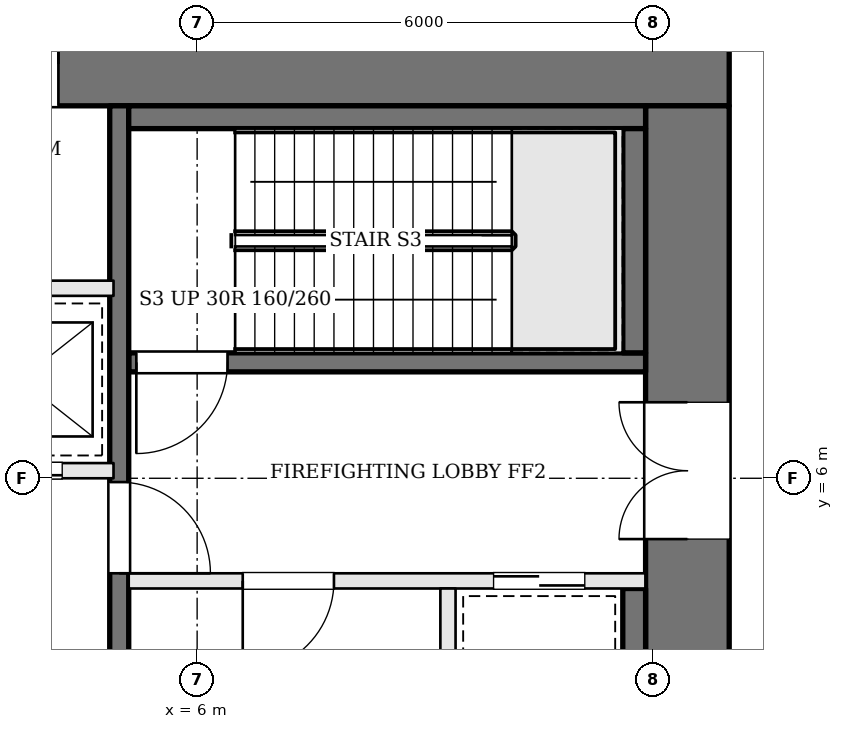
"""IFC4 building model, lengths in metres.
Left out: names, types, materials, properties, quantities, classifications, styles, units other than length and angle.
Written with IfcOpenShell. Run it as: python <this file> out.ifc"""

import sys

from ifc_helpers import new_model, si_unit, direction, frame, frame_2d, origin, place, context, subcontext, project, spatial, rectangle, extrude, element, fill, save


model = new_model("IFC4")
c1 = context("Model", 3, precision=1e-05, world=origin(), true_north=direction((0.0, 1.0)))
c2 = subcontext(c1, "Body", "Model", "MODEL_VIEW")
j1 = project(units=[si_unit("LENGTHUNIT", "METRE"), si_unit("PLANEANGLEUNIT", "RADIAN")], contexts=[c1])
p1 = place(None, origin())
s1 = spatial("IfcSite", under=j1, at=p1, CompositionType="ELEMENT")
p2 = place(p1, origin())
s2 = spatial("IfcBuilding", under=s1, at=p2, CompositionType="ELEMENT")
p3 = place(p2, frame((0.0, 0.0, 125.7)))
s3 = spatial("IfcBuildingStorey", under=s2, at=p3, CompositionType="ELEMENT", Elevation=125.7)
p4 = place(p3, frame((-13.0, 11.45, 0.0), z_axis=(0.0, 0.0, 1.0), x_axis=(1.0, 0.0, 0.0)))
e1 = element("IfcWall", 1, at=p4, inside=s3, PredefinedType="SHEAR", context=c2, shape_type="SweptSolid", body=[
    extrude(rectangle(XDim=26.0, YDim=1.1, at=frame_2d((13.0, 0.0))), origin(), (0.0, 0.0, 1.0), 4.8),
])
p5 = place(p4, frame((9.375, 0.0, 0.0)))
e2 = element("IfcOpeningElement", 2, at=p5, cuts=e1, PredefinedType="OPENING", context=c2, shape_type="SweptSolid", body=[
    extrude(rectangle(XDim=0.7, YDim=2.1, at=frame_2d((0.35, 1.05))), frame((0.0, 0.56, 0.0), z_axis=(0.0, -1.0, 0.0), x_axis=(1.0, 0.0, 0.0)), (0.0, 0.0, 1.0), 1.12),
])
p6 = place(p4, frame((11.825, 0.0, 0.0)))
e3 = element("IfcOpeningElement", 3, at=p6, cuts=e1, PredefinedType="OPENING", context=c2, shape_type="SweptSolid", body=[
    extrude(rectangle(XDim=0.7, YDim=2.1, at=frame_2d((0.35, 1.05))), frame((0.0, 0.56, 0.0), z_axis=(0.0, -1.0, 0.0), x_axis=(1.0, 0.0, 0.0)), (0.0, 0.0, 1.0), 1.12),
])
p7 = place(p4, frame((13.725, 0.0, 0.0)))
e4 = element("IfcOpeningElement", 4, at=p7, cuts=e1, PredefinedType="OPENING", context=c2, shape_type="SweptSolid", body=[
    extrude(rectangle(XDim=1.0, YDim=2.1, at=frame_2d((0.5, 1.05))), frame((0.0, 0.56, 0.0), z_axis=(0.0, -1.0, 0.0), x_axis=(1.0, 0.0, 0.0)), (0.0, 0.0, 1.0), 1.12),
])
p8 = place(p4, frame((16.175, 0.0, 0.0)))
e5 = element("IfcOpeningElement", 5, at=p8, cuts=e1, PredefinedType="OPENING", context=c2, shape_type="SweptSolid", body=[
    extrude(rectangle(XDim=1.0, YDim=2.1, at=frame_2d((0.5, 1.05))), frame((0.0, 0.56, 0.0), z_axis=(0.0, -1.0, 0.0), x_axis=(1.0, 0.0, 0.0)), (0.0, 0.0, 1.0), 1.12),
])
p9 = place(p3, frame((12.45, -1.9, 0.0), z_axis=(0.0, 0.0, 1.0), x_axis=(0.0, 1.0, 0.0)))
e6 = element("IfcWall", 6, at=p9, inside=s3, PredefinedType="SHEAR", context=c2, shape_type="SweptSolid", body=[
    extrude(rectangle(XDim=12.8, YDim=1.1, at=frame_2d((6.4, 0.0))), origin(), (0.0, 0.0, 1.0), 4.8),
])
p10 = place(p9, frame((7.1, 0.0, 0.0)))
e7 = element("IfcOpeningElement", 7, at=p10, cuts=e6, PredefinedType="OPENING", context=c2, shape_type="SweptSolid", body=[
    extrude(rectangle(XDim=1.8, YDim=2.1, at=frame_2d((0.9, 1.05))), frame((0.0, 0.56, 0.0), z_axis=(0.0, -1.0, 0.0), x_axis=(1.0, 0.0, 0.0)), (0.0, 0.0, 1.0), 1.12),
])
p11 = place(p3, frame((11.9, 7.525, 0.0), z_axis=(0.0, 0.0, 1.0), x_axis=(-1.0, 0.0, 0.0)))
e8 = element("IfcWall", 8, at=p11, inside=s3, PredefinedType="SOLIDWALL", context=c2, shape_type="SweptSolid", body=[
    extrude(rectangle(XDim=6.8, YDim=0.25, at=frame_2d((3.4, 0.0))), origin(), (0.0, 0.0, 1.0), 4.6),
])
p12 = place(p11, frame((5.5, 0.0, 0.0)))
e9 = element("IfcOpeningElement", 9, at=p12, cuts=e8, PredefinedType="OPENING", context=c2, shape_type="SweptSolid", body=[
    extrude(rectangle(XDim=1.2, YDim=2.1, at=frame_2d((0.6, 1.05))), frame((0.0, 0.135, 0.0), z_axis=(0.0, -1.0, 0.0), x_axis=(1.0, 0.0, 0.0)), (0.0, 0.0, 1.0), 0.27),
])
p13 = place(p3, frame((11.9, 4.65, 0.0), z_axis=(0.0, 0.0, 1.0), x_axis=(-1.0, 0.0, 0.0)))
e10 = element("IfcWall", 10, at=p13, inside=s3, PredefinedType="SOLIDWALL", context=c2, shape_type="SweptSolid", body=[
    extrude(rectangle(XDim=6.8, YDim=0.2, at=frame_2d((3.4, 0.0))), origin(), (0.0, 0.0, 1.0), 4.6),
])
p14 = place(p13, frame((4.1, 0.0, 0.0)))
e11 = element("IfcOpeningElement", 11, at=p14, cuts=e10, PredefinedType="OPENING", context=c2, shape_type="SweptSolid", body=[
    extrude(rectangle(XDim=1.2, YDim=2.1, at=frame_2d((0.6, 1.05))), frame((0.0, 0.11, 0.0), z_axis=(0.0, -1.0, 0.0), x_axis=(1.0, 0.0, 0.0)), (0.0, 0.0, 1.0), 0.22),
])
p15 = place(p13, frame((0.8, 0.0, 0.0)))
e12 = element("IfcOpeningElement", 12, at=p15, cuts=e10, PredefinedType="OPENING", context=c2, shape_type="SweptSolid", body=[
    extrude(rectangle(XDim=1.2, YDim=2.1, at=frame_2d((0.6, 1.05))), frame((0.0, 0.11, 0.0), z_axis=(0.0, -1.0, 0.0), x_axis=(1.0, 0.0, 0.0)), (0.0, 0.0, 1.0), 0.22),
])
p16 = place(p3, frame((9.3, 4.55, 0.0), z_axis=(0.0, 0.0, 1.0), x_axis=(0.0, -1.0, 0.0)))
e13 = element("IfcWall", 13, at=p16, inside=s3, PredefinedType="SOLIDWALL", context=c2, shape_type="SweptSolid", body=[
    extrude(rectangle(XDim=3.0, YDim=0.2, at=frame_2d((1.5, 0.0))), origin(), (0.0, 0.0, 1.0), 4.6),
])
p17 = place(p3, frame((4.975, 10.9, 0.0), z_axis=(0.0, 0.0, 1.0), x_axis=(0.0, -1.0, 0.0)))
e14 = element("IfcWall", 14, at=p17, inside=s3, PredefinedType="SOLIDWALL", context=c2, shape_type="SweptSolid", body=[
    extrude(rectangle(XDim=12.8, YDim=0.25, at=frame_2d((6.4, 0.0))), origin(), (0.0, 0.0, 1.0), 4.6),
])
p18 = place(p17, frame((4.95, 0.0, 0.0)))
e15 = element("IfcOpeningElement", 15, at=p18, cuts=e14, PredefinedType="OPENING", context=c2, shape_type="SweptSolid", body=[
    extrude(rectangle(XDim=1.2, YDim=2.1, at=frame_2d((0.6, 1.05))), frame((0.0, 0.135, 0.0), z_axis=(0.0, -1.0, 0.0), x_axis=(1.0, 0.0, 0.0)), (0.0, 0.0, 1.0), 0.27),
])
p19 = place(p3, frame((11.9, 10.75, 0.0), z_axis=(0.0, 0.0, 1.0), x_axis=(-1.0, 0.0, 0.0)))
e16 = element("IfcWall", 16, at=p19, inside=s3, PredefinedType="SOLIDWALL", context=c2, shape_type="SweptSolid", body=[
    extrude(rectangle(XDim=6.8, YDim=0.3, at=frame_2d((3.4, 0.0))), origin(), (0.0, 0.0, 1.0), 4.6),
])
p20 = place(p3, frame((11.75, 10.6, 0.0), z_axis=(0.0, 0.0, 1.0), x_axis=(0.0, -1.0, 0.0)))
e17 = element("IfcWall", 17, at=p20, inside=s3, PredefinedType="SOLIDWALL", context=c2, shape_type="SweptSolid", body=[
    extrude(rectangle(XDim=2.95, YDim=0.3, at=frame_2d((1.475, 0.0))), origin(), (0.0, 0.0, 1.0), 4.6),
])
p21 = place(p3, frame((11.75, 4.55, 0.0), z_axis=(0.0, 0.0, 1.0), x_axis=(0.0, -1.0, 0.0)))
e18 = element("IfcWall", 18, at=p21, inside=s3, PredefinedType="SOLIDWALL", context=c2, shape_type="SweptSolid", body=[
    extrude(rectangle(XDim=3.0, YDim=0.3, at=frame_2d((1.5, 0.0))), origin(), (0.0, 0.0, 1.0), 4.6),
])
p22 = place(p3, frame((-4.9, 6.1, 0.0), z_axis=(0.0, 0.0, 1.0), x_axis=(1.0, 0.0, 0.0)))
e19 = element("IfcWall", 19, at=p22, inside=s3, PredefinedType="SOLIDWALL", context=c2, shape_type="SweptSolid", body=[
    extrude(rectangle(XDim=9.8, YDim=0.2, at=frame_2d((4.9, 0.0))), origin(), (0.0, 0.0, 1.0), 4.6),
])
p23 = place(p22, frame((0.675, 0.0, 0.0)))
e20 = element("IfcOpeningElement", 20, at=p23, cuts=e19, PredefinedType="OPENING", context=c2, shape_type="SweptSolid", body=[
    extrude(rectangle(XDim=1.1, YDim=2.1, at=frame_2d((0.55, 1.05))), frame((0.0, 0.11, 0.0), z_axis=(0.0, -1.0, 0.0), x_axis=(1.0, 0.0, 0.0)), (0.0, 0.0, 1.0), 0.22),
])
p24 = place(p22, frame((3.125, 0.0, 0.0)))
e21 = element("IfcOpeningElement", 21, at=p24, cuts=e19, PredefinedType="OPENING", context=c2, shape_type="SweptSolid", body=[
    extrude(rectangle(XDim=1.1, YDim=2.1, at=frame_2d((0.55, 1.05))), frame((0.0, 0.11, 0.0), z_axis=(0.0, -1.0, 0.0), x_axis=(1.0, 0.0, 0.0)), (0.0, 0.0, 1.0), 0.22),
])
p25 = place(p22, frame((5.575, 0.0, 0.0)))
e22 = element("IfcOpeningElement", 22, at=p25, cuts=e19, PredefinedType="OPENING", context=c2, shape_type="SweptSolid", body=[
    extrude(rectangle(XDim=1.1, YDim=2.1, at=frame_2d((0.55, 1.05))), frame((0.0, 0.11, 0.0), z_axis=(0.0, -1.0, 0.0), x_axis=(1.0, 0.0, 0.0)), (0.0, 0.0, 1.0), 0.22),
])
p26 = place(p22, frame((8.025, 0.0, 0.0)))
e23 = element("IfcOpeningElement", 23, at=p26, cuts=e19, PredefinedType="OPENING", context=c2, shape_type="SweptSolid", body=[
    extrude(rectangle(XDim=1.1, YDim=2.1, at=frame_2d((0.55, 1.05))), frame((0.0, 0.11, 0.0), z_axis=(0.0, -1.0, 0.0), x_axis=(1.0, 0.0, 0.0)), (0.0, 0.0, 1.0), 0.22),
])
p27 = place(p3, frame((-4.9, 8.5, 0.0), z_axis=(0.0, 0.0, 1.0), x_axis=(1.0, 0.0, 0.0)))
e24 = element("IfcWall", 24, at=p27, inside=s3, PredefinedType="SOLIDWALL", context=c2, shape_type="SweptSolid", body=[
    extrude(rectangle(XDim=9.8, YDim=0.2, at=frame_2d((4.9, 0.0))), origin(), (0.0, 0.0, 1.0), 4.6),
])
p28 = place(p10, origin())
e25 = element("IfcDoor", 25, at=p28, inside=s3, OperationType="DOUBLE_DOOR_SINGLE_SWING", PredefinedType="DOOR", context=c2, shape_type="SweptSolid", body=[
    extrude(rectangle(XDim=1.8, YDim=2.1, at=frame_2d((0.9, 1.05))), frame((0.0, 0.025, 0.0), z_axis=(0.0, -1.0, 0.0), x_axis=(1.0, 0.0, 0.0)), (0.0, 0.0, 1.0), 0.05),
])
fill(e7, e25)
p29 = place(p18, origin())
e26 = element("IfcDoor", 26, at=p29, inside=s3, OperationType="SINGLE_SWING_RIGHT", PredefinedType="DOOR", context=c2, shape_type="SweptSolid", body=[
    extrude(rectangle(XDim=1.2, YDim=2.1, at=frame_2d((0.6, 1.05))), frame((0.0, 0.025, 0.0), z_axis=(0.0, -1.0, 0.0), x_axis=(1.0, 0.0, 0.0)), (0.0, 0.0, 1.0), 0.05),
])
fill(e15, e26)
p30 = place(p14, origin())
e27 = element("IfcDoor", 27, at=p30, inside=s3, OperationType="SINGLE_SWING_RIGHT", PredefinedType="DOOR", context=c2, shape_type="SweptSolid", body=[
    extrude(rectangle(XDim=1.2, YDim=2.1, at=frame_2d((0.6, 1.05))), frame((0.0, 0.025, 0.0), z_axis=(0.0, -1.0, 0.0), x_axis=(1.0, 0.0, 0.0)), (0.0, 0.0, 1.0), 0.05),
])
fill(e11, e27)
p31 = place(p12, origin())
e28 = element("IfcDoor", 28, at=p31, inside=s3, OperationType="SINGLE_SWING_RIGHT", PredefinedType="DOOR", context=c2, shape_type="SweptSolid", body=[
    extrude(rectangle(XDim=1.2, YDim=2.1, at=frame_2d((0.6, 1.05))), frame((0.0, 0.025, 0.0), z_axis=(0.0, -1.0, 0.0), x_axis=(1.0, 0.0, 0.0)), (0.0, 0.0, 1.0), 0.05),
])
fill(e9, e28)
p32 = place(p15, origin())
e29 = element("IfcDoor", 29, at=p32, inside=s3, OperationType="SLIDING_TO_RIGHT", PredefinedType="DOOR", context=c2, shape_type="SweptSolid", body=[
    extrude(rectangle(XDim=1.2, YDim=2.1, at=frame_2d((0.6, 1.05))), frame((0.0, 0.025, 0.0), z_axis=(0.0, -1.0, 0.0), x_axis=(1.0, 0.0, 0.0)), (0.0, 0.0, 1.0), 0.05),
])
fill(e12, e29)
p33 = place(p26, origin())
e30 = element("IfcDoor", 30, at=p33, inside=s3, OperationType="SLIDING_TO_LEFT", PredefinedType="DOOR", context=c2, shape_type="SweptSolid", body=[
    extrude(rectangle(XDim=1.1, YDim=2.1, at=frame_2d((0.55, 1.05))), frame((0.0, 0.025, 0.0), z_axis=(0.0, -1.0, 0.0), x_axis=(1.0, 0.0, 0.0)), (0.0, 0.0, 1.0), 0.05),
])
fill(e23, e30)
p34 = place(p8, origin())
e31 = element("IfcDoor", 31, at=p34, inside=s3, OperationType="SINGLE_SWING_RIGHT", PredefinedType="DOOR", context=c2, shape_type="SweptSolid", body=[
    extrude(rectangle(XDim=1.0, YDim=2.1, at=frame_2d((0.5, 1.05))), frame((0.0, 0.025, 0.0), z_axis=(0.0, -1.0, 0.0), x_axis=(1.0, 0.0, 0.0)), (0.0, 0.0, 1.0), 0.05),
])
fill(e5, e31)
save(model, sys.argv[1])
